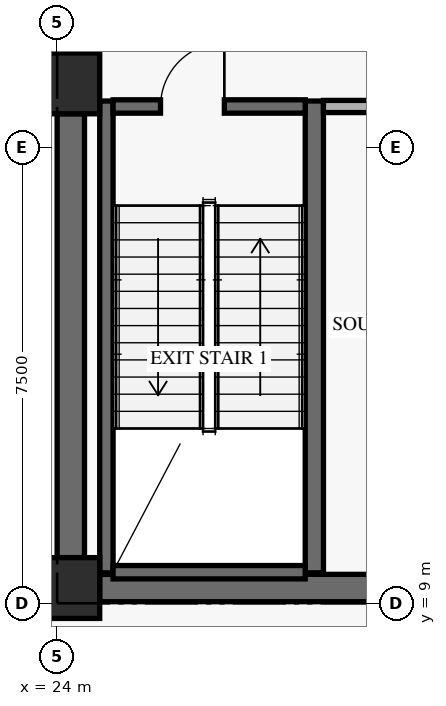
"""IFC4 building model, lengths in metres.
Left out: names, types, materials, properties, quantities, classifications, styles, units other than length and angle.
Written with IfcOpenShell. Run it as: python <this file> out.ifc"""

import sys

from ifc_helpers import new_model, si_unit, direction, frame, frame_2d, origin, origin_2d, place, context, subcontext, project, spatial, rectangle, extrude, element, fill, save


model = new_model("IFC4")
c1 = context("Model", 3, precision=1e-05, world=origin(), true_north=direction((0.0, 1.0)))
c2 = subcontext(c1, "Body", "Model", "MODEL_VIEW")
j1 = project(units=[si_unit("LENGTHUNIT", "METRE"), si_unit("PLANEANGLEUNIT", "RADIAN")], contexts=[c1])
p1 = place(None, origin())
s1 = spatial("IfcSite", under=j1, at=p1, CompositionType="ELEMENT")
p2 = place(p1, origin())
s2 = spatial("IfcBuilding", under=s1, at=p2, CompositionType="ELEMENT")
p3 = place(p2, frame((0.0, 0.0, 9.6)))
s3 = spatial("IfcBuildingStorey", under=s2, at=p3, CompositionType="ELEMENT", Elevation=9.6)
p4 = place(p3, frame((24.225, 9.75, 0.0), z_axis=(0.0, 0.0, 1.0), x_axis=(0.0, 1.0, 0.0)))
e1 = element("IfcWall", 1, at=p4, inside=s3, PredefinedType="SHEAR", context=c2, shape_type="SweptSolid", body=[
    extrude(rectangle(XDim=7.3, YDim=0.45, at=frame_2d((3.65, 0.0))), origin(), (0.0, 0.0, 1.0), 3.75),
])
p5 = place(p3, frame((24.225, 18.05, 0.0), z_axis=(0.0, 0.0, 1.0), x_axis=(0.0, 1.0, 0.0)))
e2 = element("IfcWall", 2, at=p5, inside=s3, PredefinedType="SHEAR", context=c2, shape_type="SweptSolid", body=[
    extrude(rectangle(XDim=11.65, YDim=0.45, at=frame_2d((5.825, 0.0))), origin(), (0.0, 0.0, 1.0), 3.75),
])
p6 = place(p3, frame((24.7, 9.25, 0.0), z_axis=(0.0, 0.0, 1.0), x_axis=(1.0, 0.0, 0.0)))
e3 = element("IfcWall", 3, at=p6, inside=s3, PredefinedType="SHEAR", context=c2, shape_type="SweptSolid", body=[
    extrude(rectangle(XDim=10.0, YDim=0.45, at=frame_2d((5.0, 0.0))), origin(), (0.0, 0.0, 1.0), 4.52),
])
p7 = place(p3, frame((24.81, 9.5, 0.0), z_axis=(0.0, 0.0, 1.0), x_axis=(0.0, 1.0, 0.0)))
e4 = element("IfcWall", 4, at=p7, inside=s3, PredefinedType="SHEAR", context=c2, shape_type="SweptSolid", body=[
    extrude(rectangle(XDim=7.76, YDim=0.22, at=frame_2d((3.88, 0.0))), origin(), (0.0, 0.0, 1.0), 4.52),
])
p8 = place(p3, frame((28.23, 9.5, 0.0), z_axis=(0.0, 0.0, 1.0), x_axis=(0.0, 1.0, 0.0)))
e5 = element("IfcWall", 5, at=p8, inside=s3, PredefinedType="SHEAR", context=c2, shape_type="SweptSolid", body=[
    extrude(rectangle(XDim=7.76, YDim=0.3, at=frame_2d((3.88, 0.0))), origin(), (0.0, 0.0, 1.0), 4.52),
])
p9 = place(p3, frame((24.92, 9.51, 0.0), z_axis=(0.0, 0.0, 1.0), x_axis=(1.0, 0.0, 0.0)))
e6 = element("IfcWall", 6, at=p9, inside=s3, PredefinedType="SHEAR", context=c2, shape_type="SweptSolid", body=[
    extrude(rectangle(XDim=3.16, YDim=0.22, at=frame_2d((1.58, 0.0))), origin(), (0.0, 0.0, 1.0), 4.52),
])
p10 = place(p3, frame((24.92, 17.17, 0.0), z_axis=(0.0, 0.0, 1.0), x_axis=(1.0, 0.0, 0.0)))
e7 = element("IfcWall", 7, at=p10, inside=s3, PredefinedType="SHEAR", context=c2, shape_type="SweptSolid", body=[
    extrude(rectangle(XDim=3.16, YDim=0.22, at=frame_2d((1.58, 0.0))), origin(), (0.0, 0.0, 1.0), 4.52),
])
p11 = place(p10, frame((0.78, 0.0, 0.0)))
e8 = element("IfcOpeningElement", 8, at=p11, cuts=e7, PredefinedType="OPENING", context=c2, shape_type="SweptSolid", body=[
    extrude(rectangle(XDim=1.05, YDim=2.15, at=frame_2d((0.525, 1.075))), frame((0.0, 0.12, 0.0), z_axis=(0.0, -1.0, 0.0), x_axis=(1.0, 0.0, 0.0)), (0.0, 0.0, 1.0), 0.24),
])
for number, where, z_axis, x_axis in (
    (9, (24.2, 9.25, 0.0), (0.0, 0.0, 1.0), (1.0, 0.0, 0.0)),
    (10, (24.2, 17.55, 0.0), (0.0, 0.0, 1.0), (1.0, 0.0, 0.0)),
):
    element("IfcColumn", number, at=place(p3, frame(where, z_axis=z_axis, x_axis=x_axis)), inside=s3, PredefinedType="COLUMN", context=c2, shape_type="SweptSolid", body=[
        extrude(rectangle(XDim=1.0, YDim=1.0, at=origin_2d()), origin(), (0.0, 0.0, 1.0), 4.8),
    ])
p12 = place(p3, frame((28.38, 17.17, 0.0), z_axis=(0.0, 0.0, 1.0), x_axis=(1.0, 0.0, 0.0)))
e11 = element("IfcWall", 11, at=p12, inside=s3, PredefinedType="STANDARD", context=c2, shape_type="SweptSolid", body=[
    extrude(rectangle(XDim=2.9, YDim=0.2, at=frame_2d((1.45, 0.0))), origin(), (0.0, 0.0, 1.0), 4.52),
])
p13 = place(p11, frame((1.05, 0.0, 0.0), z_axis=(0.0, 0.0, 1.0), x_axis=(-1.0, 0.0, 0.0)))
e12 = element("IfcDoor", 12, at=p13, inside=s3, OperationType="SINGLE_SWING_LEFT", PredefinedType="DOOR", context=c2, shape_type="SweptSolid", body=[
    extrude(rectangle(XDim=1.05, YDim=2.15, at=frame_2d((0.525, 1.075))), frame((0.0, 0.025, 0.0), z_axis=(0.0, -1.0, 0.0), x_axis=(1.0, 0.0, 0.0)), (0.0, 0.0, 1.0), 0.05),
])
fill(e8, e12)
save(model, sys.argv[1])
